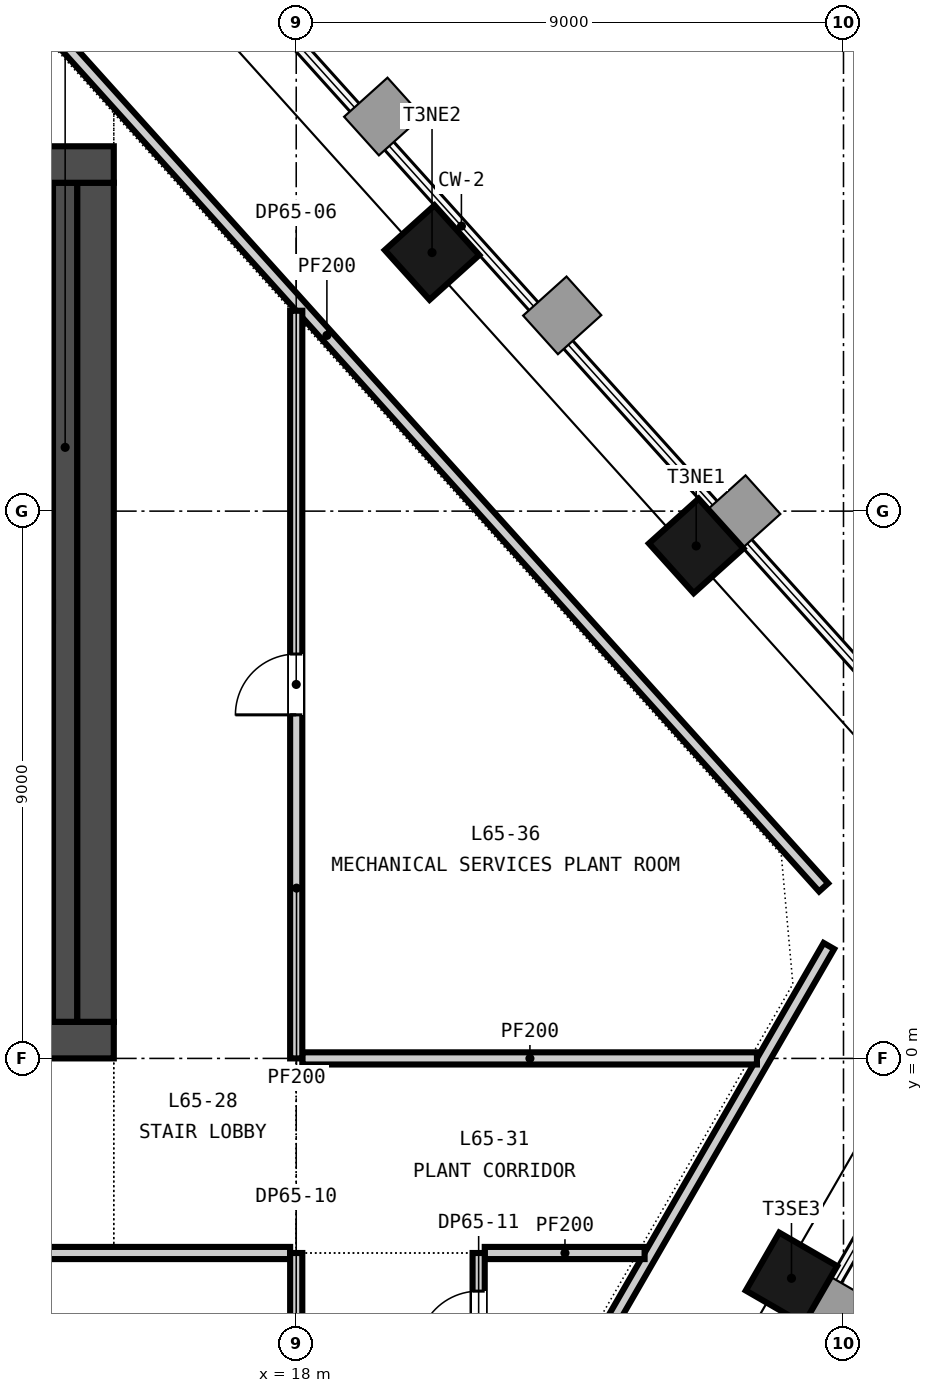
"""IFC4 building model, lengths in metres.
Left out: names, types, materials, properties, quantities, classifications, styles, units other than length and angle.
Written with IfcOpenShell. Run it as: python <this file> out.ifc"""

import sys

from ifc_helpers import new_model, si_unit, direction, frame, frame_2d, origin, origin_2d, place, context, subcontext, project, spatial, rectangle, extrude, element, fill, save


model = new_model("IFC4")
c1 = context("Model", 3, precision=1e-05, world=origin(), true_north=direction((0.0, 1.0)))
c2 = subcontext(c1, "Body", "Model", "MODEL_VIEW")
j1 = project(units=[si_unit("LENGTHUNIT", "METRE"), si_unit("PLANEANGLEUNIT", "RADIAN")], contexts=[c1])
p1 = place(None, origin())
s1 = spatial("IfcSite", under=j1, at=p1, CompositionType="ELEMENT")
p2 = place(p1, origin())
s2 = spatial("IfcBuilding", under=s1, at=p2, CompositionType="ELEMENT")
p3 = place(p2, frame((0.0, 0.0, 256.45)))
s3 = spatial("IfcBuildingStorey", under=s2, at=p3, CompositionType="ELEMENT", Elevation=256.45)
p4 = place(p3, frame((-15.0, 0.3, -0.3), z_axis=(0.0, 0.0, 1.0), x_axis=(1.0, 0.0, 0.0)))
e1 = element("IfcWall", 1, at=p4, inside=s3, PredefinedType="SOLIDWALL", context=c2, shape_type="SweptSolid", body=[
    extrude(rectangle(XDim=30.0, YDim=0.6, at=frame_2d((15.0, 0.0))), origin(), (0.0, 0.0, 1.0), 4.65),
])
p5 = place(p4, frame((5.8, 0.0, 0.3)))
e2 = element("IfcOpeningElement", 2, at=p5, cuts=e1, PredefinedType="OPENING", context=c2, shape_type="SweptSolid", body=[
    extrude(rectangle(XDim=2.4, YDim=2.4, at=frame_2d((1.2, 1.2))), frame((0.0, 0.31, 0.0), z_axis=(0.0, -1.0, 0.0), x_axis=(1.0, 0.0, 0.0)), (0.0, 0.0, 1.0), 0.62),
])
p6 = place(p4, frame((13.8, 0.0, 0.3)))
e3 = element("IfcOpeningElement", 3, at=p6, cuts=e1, PredefinedType="OPENING", context=c2, shape_type="SweptSolid", body=[
    extrude(rectangle(XDim=2.4, YDim=2.4, at=frame_2d((1.2, 1.2))), frame((0.0, 0.31, 0.0), z_axis=(0.0, -1.0, 0.0), x_axis=(1.0, 0.0, 0.0)), (0.0, 0.0, 1.0), 0.62),
])
p7 = place(p4, frame((21.8, 0.0, 0.3)))
e4 = element("IfcOpeningElement", 4, at=p7, cuts=e1, PredefinedType="OPENING", context=c2, shape_type="SweptSolid", body=[
    extrude(rectangle(XDim=2.4, YDim=2.4, at=frame_2d((1.2, 1.2))), frame((0.0, 0.31, 0.0), z_axis=(0.0, -1.0, 0.0), x_axis=(1.0, 0.0, 0.0)), (0.0, 0.0, 1.0), 0.62),
])
p8 = place(p4, frame((1.5, 0.0, 0.3)))
e5 = element("IfcOpeningElement", 5, at=p8, cuts=e1, PredefinedType="OPENING", context=c2, shape_type="SweptSolid", body=[
    extrude(rectangle(XDim=1.2, YDim=2.1, at=frame_2d((0.6, 1.05))), frame((0.0, 0.31, 0.0), z_axis=(0.0, -1.0, 0.0), x_axis=(1.0, 0.0, 0.0)), (0.0, 0.0, 1.0), 0.62),
])
p9 = place(p4, frame((27.3, 0.0, 0.3)))
e6 = element("IfcOpeningElement", 6, at=p9, cuts=e1, PredefinedType="OPENING", context=c2, shape_type="SweptSolid", body=[
    extrude(rectangle(XDim=1.2, YDim=2.1, at=frame_2d((0.6, 1.05))), frame((0.0, 0.31, 0.0), z_axis=(0.0, -1.0, 0.0), x_axis=(1.0, 0.0, 0.0)), (0.0, 0.0, 1.0), 0.62),
])
p10 = place(p3, frame((-15.0, 14.7, -0.3), z_axis=(0.0, 0.0, 1.0), x_axis=(1.0, 0.0, 0.0)))
e7 = element("IfcWall", 7, at=p10, inside=s3, PredefinedType="SOLIDWALL", context=c2, shape_type="SweptSolid", body=[
    extrude(rectangle(XDim=30.0, YDim=0.6, at=frame_2d((15.0, 0.0))), origin(), (0.0, 0.0, 1.0), 4.65),
])
p11 = place(p10, frame((9.25, 0.0, 0.3)))
e8 = element("IfcOpeningElement", 8, at=p11, cuts=e7, PredefinedType="OPENING", context=c2, shape_type="SweptSolid", body=[
    extrude(rectangle(XDim=1.5, YDim=2.1, at=frame_2d((0.75, 1.05))), frame((0.0, 0.31, 0.0), z_axis=(0.0, -1.0, 0.0), x_axis=(1.0, 0.0, 0.0)), (0.0, 0.0, 1.0), 0.62),
])
p12 = place(p10, frame((19.4, 0.0, 0.3)))
e9 = element("IfcOpeningElement", 9, at=p12, cuts=e7, PredefinedType="OPENING", context=c2, shape_type="SweptSolid", body=[
    extrude(rectangle(XDim=1.5, YDim=2.1, at=frame_2d((0.75, 1.05))), frame((0.0, 0.31, 0.0), z_axis=(0.0, -1.0, 0.0), x_axis=(1.0, 0.0, 0.0)), (0.0, 0.0, 1.0), 0.62),
])
p13 = place(p10, frame((1.5, 0.0, 0.3)))
e10 = element("IfcOpeningElement", 10, at=p13, cuts=e7, PredefinedType="OPENING", context=c2, shape_type="SweptSolid", body=[
    extrude(rectangle(XDim=1.2, YDim=2.1, at=frame_2d((0.6, 1.05))), frame((0.0, 0.31, 0.0), z_axis=(0.0, -1.0, 0.0), x_axis=(1.0, 0.0, 0.0)), (0.0, 0.0, 1.0), 0.62),
])
p14 = place(p10, frame((27.3, 0.0, 0.3)))
e11 = element("IfcOpeningElement", 11, at=p14, cuts=e7, PredefinedType="OPENING", context=c2, shape_type="SweptSolid", body=[
    extrude(rectangle(XDim=1.2, YDim=2.1, at=frame_2d((0.6, 1.05))), frame((0.0, 0.31, 0.0), z_axis=(0.0, -1.0, 0.0), x_axis=(1.0, 0.0, 0.0)), (0.0, 0.0, 1.0), 0.62),
])
p15 = place(p3, frame((14.7, 0.6, -0.3), z_axis=(0.0, 0.0, 1.0), x_axis=(0.0, 1.0, 0.0)))
e12 = element("IfcWall", 12, at=p15, inside=s3, PredefinedType="SOLIDWALL", context=c2, shape_type="SweptSolid", body=[
    extrude(rectangle(XDim=13.8, YDim=0.6, at=frame_2d((6.9, 0.0))), origin(), (0.0, 0.0, 1.0), 4.65),
])
for number, where, z_axis, x_axis in (
    (13, (26.145, -3.616, -0.3), (0.0, 0.0, 1.0), (0.5, 0.866, 0.0)),
    (14, (24.577, 8.427, -0.3), (0.0, 0.0, 1.0), (-0.669, 0.743, 0.0)),
    (15, (20.233, 13.252, -0.3), (0.0, 0.0, 1.0), (-0.669, 0.743, 0.0)),
):
    element("IfcColumn", number, at=place(p3, frame(where, z_axis=z_axis, x_axis=x_axis)), inside=s3, PredefinedType="COLUMN", context=c2, shape_type="SweptSolid", body=[
        extrude(rectangle(XDim=1.1, YDim=1.1, at=origin_2d()), origin(), (0.0, 0.0, 1.0), 4.65),
    ])
p16 = place(p3, frame((11.05, 7.35, 0.0), z_axis=(0.0, 0.0, 1.0), x_axis=(1.0, 0.0, 0.0)))
e16 = element("IfcWall", 16, at=p16, inside=s3, PredefinedType="SOLIDWALL", context=c2, shape_type="SweptSolid", body=[
    extrude(rectangle(XDim=2.95, YDim=0.3, at=frame_2d((1.475, 0.0))), origin(), (0.0, 0.0, 1.0), 4.35),
])
p17 = place(p3, frame((14.2, 0.6, 0.0), z_axis=(0.0, 0.0, 1.0), x_axis=(0.0, 1.0, 0.0)))
e17 = element("IfcWall", 17, at=p17, inside=s3, PredefinedType="SOLIDWALL", context=c2, shape_type="SweptSolid", body=[
    extrude(rectangle(XDim=13.8, YDim=0.4, at=frame_2d((6.9, 0.0))), origin(), (0.0, 0.0, 1.0), 4.35),
])
p18 = place(p3, frame((9.1, -3.2, 0.0), z_axis=(0.0, 0.0, 1.0), x_axis=(1.0, 0.0, 0.0)))
e18 = element("IfcWall", 18, at=p18, inside=s3, PredefinedType="PARTITIONING", context=c2, shape_type="SweptSolid", body=[
    extrude(rectangle(XDim=8.8, YDim=0.2, at=frame_2d((4.4, 0.0))), origin(), (0.0, 0.0, 1.0), 4.35),
])
p19 = place(p3, frame((21.1, -3.2, 0.0), z_axis=(0.0, 0.0, 1.0), x_axis=(1.0, 0.0, 0.0)))
e19 = element("IfcWall", 19, at=p19, inside=s3, PredefinedType="PARTITIONING", context=c2, shape_type="SweptSolid", body=[
    extrude(rectangle(XDim=2.629, YDim=0.2, at=frame_2d((1.314, 0.0))), origin(), (0.0, 0.0, 1.0), 4.35),
])
p20 = place(p3, frame((18.1, 0.0, 0.0), z_axis=(0.0, 0.0, 1.0), x_axis=(1.0, 0.0, 0.0)))
e20 = element("IfcWall", 20, at=p20, inside=s3, PredefinedType="PARTITIONING", context=c2, shape_type="SweptSolid", body=[
    extrude(rectangle(XDim=7.477, YDim=0.2, at=frame_2d((3.738, 0.0))), origin(), (0.0, 0.0, 1.0), 4.35),
])
p21 = place(p3, frame((18.0, -13.123, 0.0), z_axis=(0.0, 0.0, 1.0), x_axis=(0.0, 1.0, 0.0)))
e21 = element("IfcWall", 21, at=p21, inside=s3, PredefinedType="PARTITIONING", context=c2, shape_type="SweptSolid", body=[
    extrude(rectangle(XDim=9.923, YDim=0.2, at=frame_2d((4.961, 0.0))), origin(), (0.0, 0.0, 1.0), 4.35),
])
p22 = place(p21, frame((4.6, 0.0, 0.0)))
e22 = element("IfcOpeningElement", 22, at=p22, cuts=e21, PredefinedType="OPENING", context=c2, shape_type="SweptSolid", body=[
    extrude(rectangle(XDim=1.0, YDim=2.1, at=frame_2d((0.5, 1.05))), frame((0.0, 0.11, 0.0), z_axis=(0.0, -1.0, 0.0), x_axis=(1.0, 0.0, 0.0)), (0.0, 0.0, 1.0), 0.22),
])
p23 = place(p3, frame((18.0, 0.0, 0.0), z_axis=(0.0, 0.0, 1.0), x_axis=(0.0, 1.0, 0.0)))
e23 = element("IfcWall", 23, at=p23, inside=s3, PredefinedType="PARTITIONING", context=c2, shape_type="SweptSolid", body=[
    extrude(rectangle(XDim=12.295, YDim=0.2, at=frame_2d((6.147, 0.0))), origin(), (0.0, 0.0, 1.0), 3.601),
])
p24 = place(p23, frame((5.65, 0.0, 0.0)))
e24 = element("IfcOpeningElement", 24, at=p24, cuts=e23, PredefinedType="OPENING", context=c2, shape_type="SweptSolid", body=[
    extrude(rectangle(XDim=1.0, YDim=2.1, at=frame_2d((0.5, 1.05))), frame((0.0, 0.11, 0.0), z_axis=(0.0, -1.0, 0.0), x_axis=(1.0, 0.0, 0.0)), (0.0, 0.0, 1.0), 0.22),
])
p25 = place(p3, frame((21.0, -7.927, 0.0), z_axis=(0.0, 0.0, 1.0), x_axis=(0.0, 1.0, 0.0)))
e25 = element("IfcWall", 25, at=p25, inside=s3, PredefinedType="PARTITIONING", context=c2, shape_type="SweptSolid", body=[
    extrude(rectangle(XDim=4.727, YDim=0.2, at=frame_2d((2.364, 0.0))), origin(), (0.0, 0.0, 1.0), 4.35),
])
p26 = place(p25, frame((3.1, 0.0, 0.0)))
e26 = element("IfcOpeningElement", 26, at=p26, cuts=e25, PredefinedType="OPENING", context=c2, shape_type="SweptSolid", body=[
    extrude(rectangle(XDim=1.0, YDim=2.1, at=frame_2d((0.5, 1.05))), frame((0.0, 0.11, 0.0), z_axis=(0.0, -1.0, 0.0), x_axis=(1.0, 0.0, 0.0)), (0.0, 0.0, 1.0), 0.22),
])
p27 = place(p3, frame((10.326, 20.968, 0.0), z_axis=(0.0, 0.0, 1.0), x_axis=(0.669133107761, -0.743142573197, 0.0)))
e27 = element("IfcWall", 27, at=p27, inside=s3, PredefinedType="PARTITIONING", context=c2, shape_type="SweptSolid", body=[
    extrude(rectangle(XDim=24.431, YDim=0.2, at=frame_2d((12.215, 0.0))), origin(), (0.0, 0.0, 1.0), 4.35),
])
p28 = place(p3, frame((26.76, 1.849, 0.0), z_axis=(0.0, 0.0, 1.0), x_axis=(-0.499999183719, -0.866025875064, 0.0)))
e28 = element("IfcWall", 28, at=p28, inside=s3, PredefinedType="PARTITIONING", context=c2, shape_type="SweptSolid", body=[
    extrude(rectangle(XDim=22.223, YDim=0.2, at=frame_2d((11.112, 0.0))), origin(), (0.0, 0.0, 1.0), 4.35),
])
p29 = place(p24, origin())
e29 = element("IfcDoor", 29, at=p29, inside=s3, OperationType="SINGLE_SWING_LEFT", PredefinedType="DOOR", context=c2, shape_type="SweptSolid", body=[
    extrude(rectangle(XDim=1.0, YDim=2.1, at=frame_2d((0.5, 1.05))), frame((0.0, 0.025, 0.0), z_axis=(0.0, -1.0, 0.0), x_axis=(1.0, 0.0, 0.0)), (0.0, 0.0, 1.0), 0.05),
])
fill(e24, e29)
p30 = place(p26, origin())
e30 = element("IfcDoor", 30, at=p30, inside=s3, OperationType="SINGLE_SWING_LEFT", PredefinedType="DOOR", context=c2, shape_type="SweptSolid", body=[
    extrude(rectangle(XDim=1.0, YDim=2.1, at=frame_2d((0.5, 1.05))), frame((0.0, 0.025, 0.0), z_axis=(0.0, -1.0, 0.0), x_axis=(1.0, 0.0, 0.0)), (0.0, 0.0, 1.0), 0.05),
])
fill(e26, e30)
save(model, sys.argv[1])
